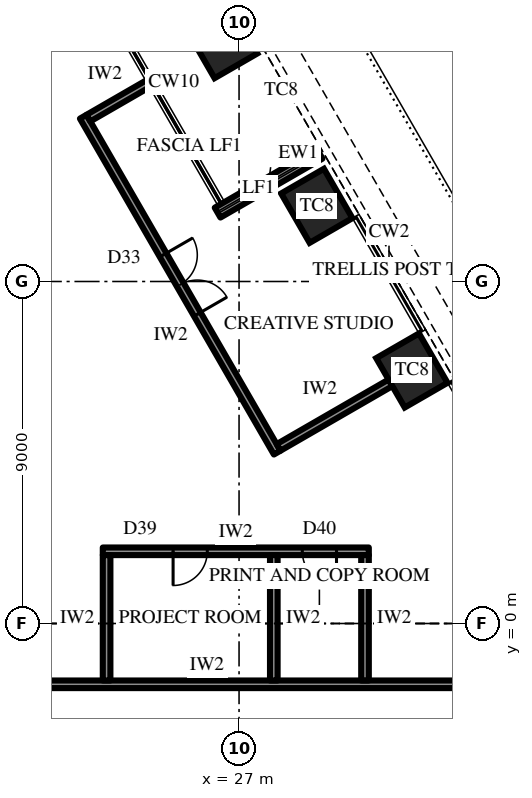
"""IFC4 building model, lengths in metres.
Left out: names, types, materials, properties, quantities, classifications, styles, units other than length and angle.
Written with IfcOpenShell. Run it as: python <this file> out.ifc"""

import sys

from ifc_helpers import new_model, si_unit, direction, frame, frame_2d, origin, origin_2d, place, context, subcontext, project, spatial, rectangle, extrude, element, fill, save


model = new_model("IFC4")
c1 = context("Model", 3, precision=1e-05, world=origin(), true_north=direction((0.0, 1.0)))
c2 = subcontext(c1, "Body", "Model", "MODEL_VIEW")
j1 = project(units=[si_unit("LENGTHUNIT", "METRE"), si_unit("PLANEANGLEUNIT", "RADIAN")], contexts=[c1])
p1 = place(None, origin())
s1 = spatial("IfcSite", under=j1, at=p1, CompositionType="ELEMENT")
p2 = place(p1, origin())
s2 = spatial("IfcBuilding", under=s1, at=p2, CompositionType="ELEMENT")
p3 = place(p2, frame((0.0, 0.0, 182.5)))
s3 = spatial("IfcBuildingStorey", under=s2, at=p3, CompositionType="ELEMENT", Elevation=182.5)
for number, where, z_axis, x_axis in (
    (1, (31.547, 6.658, 0.0), (0.0, 0.0, 1.0), (-0.5, 0.866, 0.0)),
    (2, (29.045, 10.992, 0.0), (0.0, 0.0, 1.0), (-0.5, 0.866, 0.0)),
    (3, (26.544, 15.325, 0.0), (0.0, 0.0, 1.0), (-0.5, 0.866, 0.0)),
):
    element("IfcColumn", number, at=place(p3, frame(where, z_axis=z_axis, x_axis=x_axis)), inside=s3, PredefinedType="COLUMN", context=c2, shape_type="SweptSolid", body=[
        extrude(rectangle(XDim=1.5, YDim=1.3, at=origin_2d()), origin(), (0.0, 0.0, 1.0), 4.2),
    ])
p4 = place(p3, frame((29.12, 12.363, 0.0), z_axis=(0.0, 0.0, 1.0), x_axis=(-0.86602952684, -0.49999285859, 0.0)))
e4 = element("IfcWall", 4, at=p4, inside=s3, PredefinedType="SOLIDWALL", context=c2, shape_type="SweptSolid", body=[
    extrude(rectangle(XDim=3.1, YDim=0.3, at=frame_2d((1.55, 0.0))), origin(), (0.0, 0.0, 1.0), 2.75),
])
p5 = place(p3, frame((28.003, 4.497, 0.0), z_axis=(0.0, 0.0, 1.0), x_axis=(-0.500005407604, 0.86602228168, 0.0)))
e5 = element("IfcWall", 5, at=p5, inside=s3, PredefinedType="PARTITIONING", context=c2, shape_type="SweptSolid", body=[
    extrude(rectangle(XDim=10.208, YDim=0.2, at=frame_2d((5.104, 0.0))), origin(), (0.0, 0.0, 1.0), 4.0),
])
p6 = place(p5, frame((4.204, 0.0, 0.0)))
e6 = element("IfcOpeningElement", 6, at=p6, cuts=e5, PredefinedType="OPENING", context=c2, shape_type="SweptSolid", body=[
    extrude(rectangle(XDim=1.8, YDim=2.4, at=frame_2d((0.9, 1.2))), frame((0.0, 0.11, 0.0), z_axis=(0.0, -1.0, 0.0), x_axis=(1.0, 0.0, 0.0)), (0.0, 0.0, 1.0), 0.22),
])
p7 = place(p3, frame((28.04, 4.633, 0.0), z_axis=(0.0, 0.0, 1.0), x_axis=(0.866020560687, 0.500008388397, 0.0)))
e7 = element("IfcWall", 7, at=p7, inside=s3, PredefinedType="PARTITIONING", context=c2, shape_type="SweptSolid", body=[
    extrude(rectangle(XDim=3.4, YDim=0.2, at=frame_2d((1.7, 0.0))), origin(), (0.0, 0.0, 1.0), 3.082),
])
p8 = place(p3, frame((23.036, 13.3, 0.0), z_axis=(0.0, 0.0, 1.0), x_axis=(0.866029456041, 0.49999298122, 0.0)))
e8 = element("IfcWall", 8, at=p8, inside=s3, PredefinedType="PARTITIONING", context=c2, shape_type="SweptSolid", body=[
    extrude(rectangle(XDim=1.901, YDim=0.2, at=frame_2d((0.95, 0.0))), origin(), (0.0, 0.0, 1.0), 4.0),
])
p9 = place(p3, frame((18.6, -1.6, 0.0), z_axis=(0.0, 0.0, 1.0), x_axis=(1.0, 0.0, 0.0)))
e9 = element("IfcWall", 9, at=p9, inside=s3, PredefinedType="PARTITIONING", context=c2, shape_type="SweptSolid", body=[
    extrude(rectangle(XDim=15.117, YDim=0.2, at=frame_2d((7.559, 0.0))), origin(), (0.0, 0.0, 1.0), 4.0),
])
p10 = place(p9, frame((1.012, 0.0, 0.0)))
e10 = element("IfcOpeningElement", 10, at=p10, cuts=e9, PredefinedType="OPENING", context=c2, shape_type="SweptSolid", body=[
    extrude(rectangle(XDim=1.0, YDim=2.2, at=frame_2d((0.5, 1.1))), frame((0.0, 0.11, 0.0), z_axis=(0.0, -1.0, 0.0), x_axis=(1.0, 0.0, 0.0)), (0.0, 0.0, 1.0), 0.22),
])
p11 = place(p3, frame((23.415, 1.9, 0.0), z_axis=(0.0, 0.0, 1.0), x_axis=(1.0, 0.0, 0.0)))
e11 = element("IfcWall", 11, at=p11, inside=s3, PredefinedType="PARTITIONING", context=c2, shape_type="SweptSolid", body=[
    extrude(rectangle(XDim=7.0, YDim=0.2, at=frame_2d((3.5, 0.0))), origin(), (0.0, 0.0, 1.0), 4.0),
])
p12 = place(p11, frame((1.85, 0.0, 0.0)))
e12 = element("IfcOpeningElement", 12, at=p12, cuts=e11, PredefinedType="OPENING", context=c2, shape_type="SweptSolid", body=[
    extrude(rectangle(XDim=0.9, YDim=2.2, at=frame_2d((0.45, 1.1))), frame((0.0, 0.11, 0.0), z_axis=(0.0, -1.0, 0.0), x_axis=(1.0, 0.0, 0.0)), (0.0, 0.0, 1.0), 0.22),
])
p13 = place(p11, frame((5.25, 0.0, 0.0)))
e13 = element("IfcOpeningElement", 13, at=p13, cuts=e11, PredefinedType="OPENING", context=c2, shape_type="SweptSolid", body=[
    extrude(rectangle(XDim=0.9, YDim=2.2, at=frame_2d((0.45, 1.1))), frame((0.0, 0.11, 0.0), z_axis=(0.0, -1.0, 0.0), x_axis=(1.0, 0.0, 0.0)), (0.0, 0.0, 1.0), 0.22),
])
for number, where, z_axis, x_axis in (
    (14, (23.514, -1.5, 0.0), (0.0, 0.0, 1.0), (0.0, 1.0, 0.0)),
    (15, (27.915, -1.5, 0.0), (0.0, 0.0, 1.0), (0.0, 1.0, 0.0)),
    (16, (30.314, -1.5, 0.0), (0.0, 0.0, 1.0), (0.0, 1.0, 0.0)),
):
    element("IfcWall", number, at=place(p3, frame(where, z_axis=z_axis, x_axis=x_axis)), inside=s3, PredefinedType="PARTITIONING", context=c2, shape_type="SweptSolid", body=[
        extrude(rectangle(XDim=3.3, YDim=0.2, at=frame_2d((1.65, 0.0))), origin(), (0.0, 0.0, 1.0), 4.0),
    ])
p14 = place(p6, frame((1.8, 0.0, 0.0), z_axis=(0.0, 0.0, 1.0), x_axis=(-1.0, 0.0, 0.0)))
e17 = element("IfcDoor", 17, at=p14, inside=s3, OperationType="DOUBLE_DOOR_SINGLE_SWING", PredefinedType="DOOR", context=c2, shape_type="SweptSolid", body=[
    extrude(rectangle(XDim=1.8, YDim=2.4, at=frame_2d((0.9, 1.2))), frame((0.0, 0.025, 0.0), z_axis=(0.0, -1.0, 0.0), x_axis=(1.0, 0.0, 0.0)), (0.0, 0.0, 1.0), 0.05),
])
fill(e6, e17)
p15 = place(p12, frame((0.9, 0.0, 0.0), z_axis=(0.0, 0.0, 1.0), x_axis=(-1.0, 0.0, 0.0)))
e18 = element("IfcDoor", 18, at=p15, inside=s3, OperationType="SINGLE_SWING_LEFT", PredefinedType="DOOR", context=c2, shape_type="SweptSolid", body=[
    extrude(rectangle(XDim=0.9, YDim=2.2, at=frame_2d((0.45, 1.1))), frame((0.0, 0.025, 0.0), z_axis=(0.0, -1.0, 0.0), x_axis=(1.0, 0.0, 0.0)), (0.0, 0.0, 1.0), 0.05),
])
fill(e12, e18)
p16 = place(p13, frame((0.9, 0.0, 0.0), z_axis=(0.0, 0.0, 1.0), x_axis=(-1.0, 0.0, 0.0)))
e19 = element("IfcDoor", 19, at=p16, inside=s3, OperationType="SINGLE_SWING_RIGHT", PredefinedType="DOOR", context=c2, shape_type="SweptSolid", body=[
    extrude(rectangle(XDim=0.9, YDim=2.2, at=frame_2d((0.45, 1.1))), frame((0.0, 0.025, 0.0), z_axis=(0.0, -1.0, 0.0), x_axis=(1.0, 0.0, 0.0)), (0.0, 0.0, 1.0), 0.05),
])
fill(e13, e19)
save(model, sys.argv[1])
